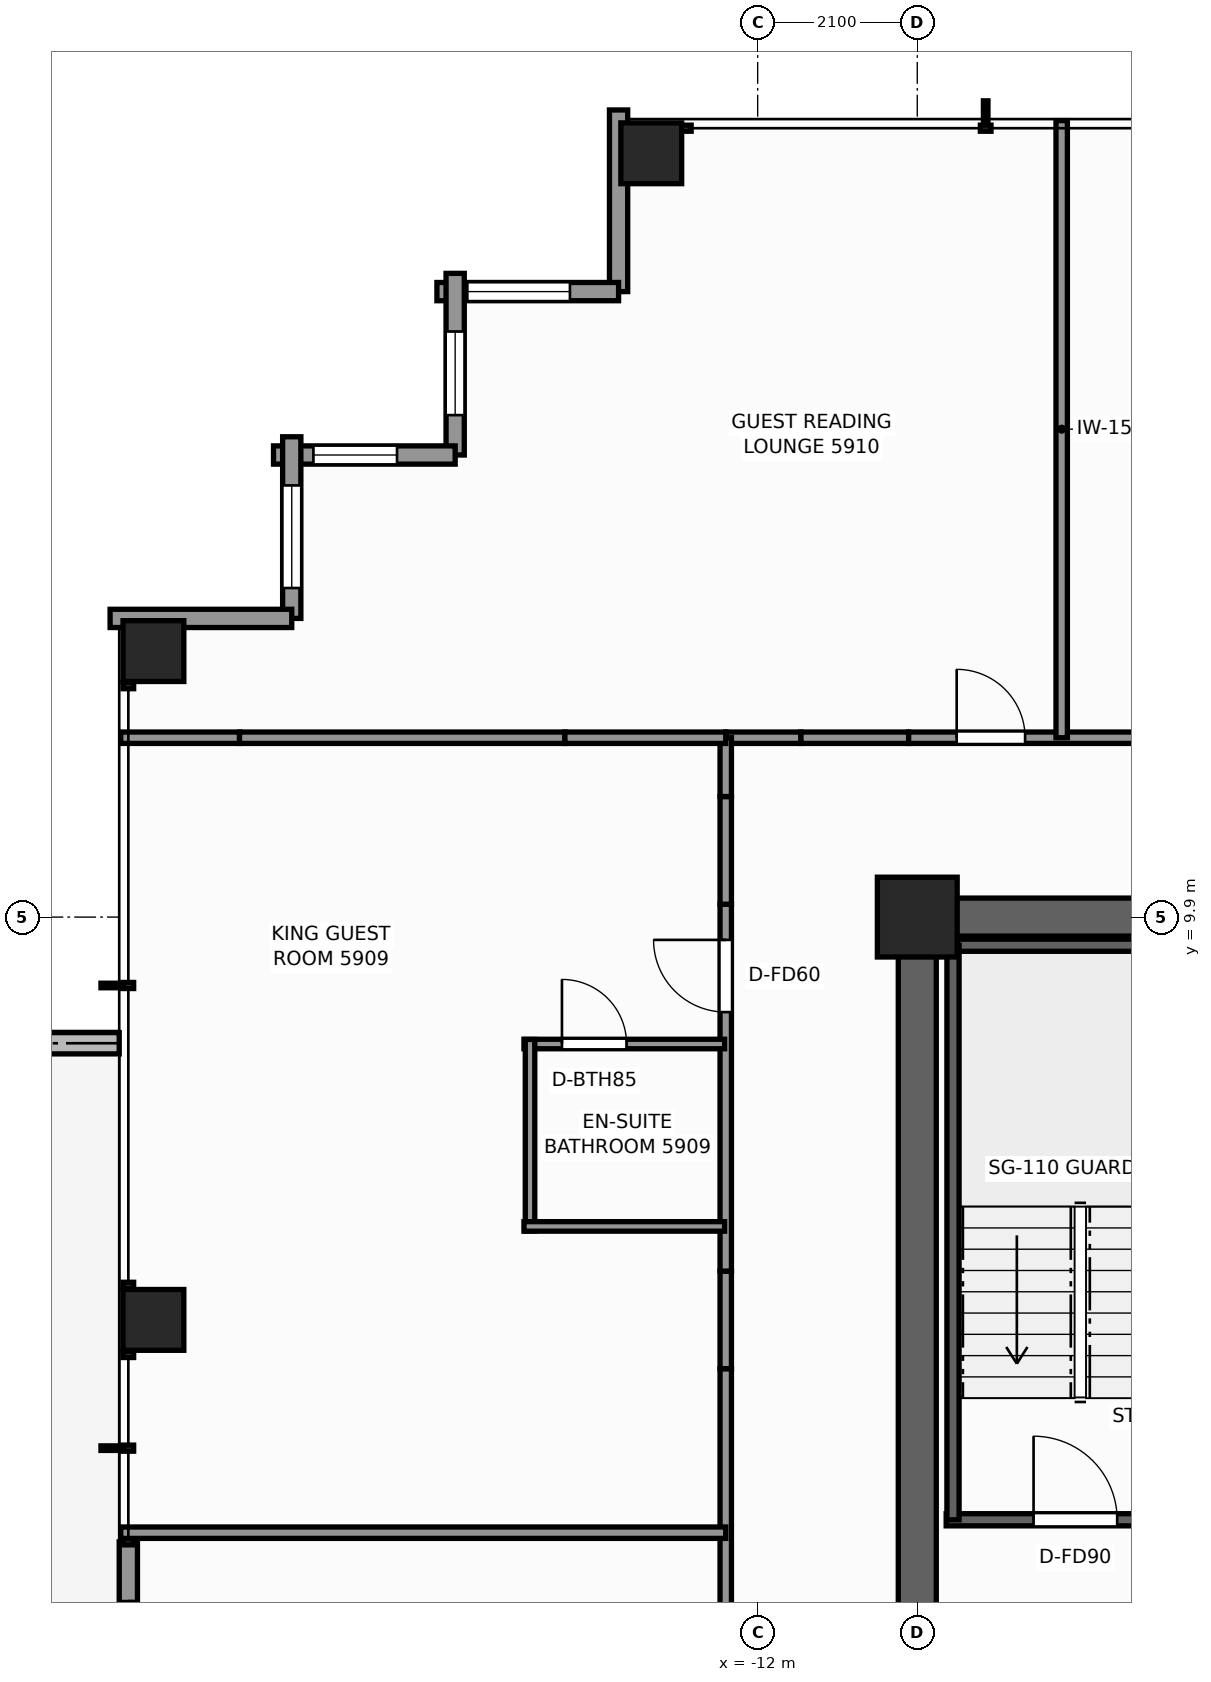
"""IFC4 building model, lengths in metres.
Left out: names, types, materials, properties, quantities, classifications, styles, units other than length and angle.
Written with IfcOpenShell. Run it as: python <this file> out.ifc"""

import sys

from ifc_helpers import new_model, si_unit, direction, frame, frame_2d, origin, origin_2d, place, context, subcontext, project, spatial, rectangle, extrude, element, fill, save


model = new_model("IFC4")
c1 = context("Model", 3, precision=1e-05, world=origin(), true_north=direction((0.0, 1.0)))
c2 = subcontext(c1, "Body", "Model", "MODEL_VIEW")
j1 = project(units=[si_unit("LENGTHUNIT", "METRE"), si_unit("PLANEANGLEUNIT", "RADIAN")], contexts=[c1])
p1 = place(None, origin())
s1 = spatial("IfcSite", under=j1, at=p1, CompositionType="ELEMENT")
p2 = place(p1, origin())
s2 = spatial("IfcBuilding", under=s1, at=p2, CompositionType="ELEMENT")
p3 = place(p2, frame((0.0, 0.0, 203.1)))
s3 = spatial("IfcBuildingStorey", under=s2, at=p3, CompositionType="ELEMENT", Elevation=203.1)
p4 = place(p3, frame((-10.15, 9.9, 0.0), z_axis=(0.0, 0.0, 1.0), x_axis=(1.0, 0.0, 0.0)))
e1 = element("IfcWall", 1, at=p4, inside=s3, PredefinedType="SHEAR", context=c2, shape_type="SweptSolid", body=[
    extrude(rectangle(XDim=14.57, YDim=0.5, at=frame_2d((7.285, 0.0))), origin(), (0.0, 0.0, 1.0), 3.3),
])
p5 = place(p3, frame((-9.9, -3.7, 0.0), z_axis=(0.0, 0.0, 1.0), x_axis=(0.0, 1.0, 0.0)))
e2 = element("IfcWall", 2, at=p5, inside=s3, PredefinedType="SHEAR", context=c2, shape_type="SweptSolid", body=[
    extrude(rectangle(XDim=13.35, YDim=0.5, at=frame_2d((6.675, 0.0))), origin(), (0.0, 0.0, 1.0), 3.3),
])
p6 = place(p5, frame((0.35, 0.0, 0.0)))
e3 = element("IfcOpeningElement", 3, at=p6, cuts=e2, PredefinedType="OPENING", context=c2, shape_type="SweptSolid", body=[
    extrude(rectangle(XDim=1.1, YDim=2.2, at=frame_2d((0.55, 1.1))), frame((0.0, 0.26, 0.0), z_axis=(0.0, -1.0, 0.0), x_axis=(1.0, 0.0, 0.0)), (0.0, 0.0, 1.0), 0.52),
])
p7 = place(p3, frame((-9.9, 9.9, 0.0), z_axis=(0.0, 0.0, 1.0), x_axis=(1.0, 0.0, 0.0)))
e4 = element("IfcColumn", 4, at=p7, inside=s3, PredefinedType="COLUMN", context=c2, shape_type="SweptSolid", body=[
    extrude(rectangle(XDim=1.05, YDim=1.05, at=origin_2d()), origin(), (0.0, 0.0, 1.0), 3.3),
])
for number, where, z_axis, x_axis in (
    (5, (-13.4, 19.95, 0.0), (0.0, 0.0, 1.0), (1.0, 0.0, 0.0)),
    (6, (-19.95, 4.6, 0.0), (0.0, 0.0, 1.0), (1.0, 0.0, 0.0)),
    (7, (-19.95, 13.4, 0.0), (0.0, 0.0, 1.0), (1.0, 0.0, 0.0)),
):
    element("IfcColumn", number, at=place(p3, frame(where, z_axis=z_axis, x_axis=x_axis)), inside=s3, PredefinedType="COLUMN", context=c2, shape_type="SweptSolid", body=[
        extrude(rectangle(XDim=0.8, YDim=0.8, at=origin_2d()), origin(), (0.0, 0.0, 1.0), 3.3),
    ])
p8 = place(p3, frame((-20.4, 8.24, -0.04), z_axis=(0.0, 0.0, 1.0), x_axis=(-1.0, 0.0, 0.0)))
e8 = element("IfcWall", 8, at=p8, inside=s3, PredefinedType="PARAPET", context=c2, shape_type="SweptSolid", body=[
    extrude(rectangle(XDim=3.214, YDim=0.28, at=frame_2d((1.607, 0.0))), origin(), (0.0, 0.0, 1.0), 0.42),
])
p9 = place(p3, frame((-13.83, 18.13, 0.0), z_axis=(0.0, 0.0, 1.0), x_axis=(0.0, 1.0, 0.0)))
e9 = element("IfcWall", 9, at=p9, inside=s3, PredefinedType="STANDARD", context=c2, shape_type="SweptSolid", body=[
    extrude(rectangle(XDim=2.39, YDim=0.24, at=frame_2d((1.195, 0.0))), origin(), (0.0, 0.0, 1.0), 1.275),
])
p10 = place(p3, frame((-16.22, 18.13, 0.0), z_axis=(0.0, 0.0, 1.0), x_axis=(1.0, 0.0, 0.0)))
e10 = element("IfcWall", 10, at=p10, inside=s3, PredefinedType="STANDARD", context=c2, shape_type="SweptSolid", body=[
    extrude(rectangle(XDim=2.39, YDim=0.24, at=frame_2d((1.195, 0.0))), origin(), (0.0, 0.0, 1.0), 2.463),
])
p11 = place(p10, frame((0.4, 0.0, 0.65)))
e11 = element("IfcOpeningElement", 11, at=p11, cuts=e10, PredefinedType="OPENING", context=c2, shape_type="SweptSolid", body=[
    extrude(rectangle(XDim=1.35, YDim=1.55, at=frame_2d((0.675, 0.775))), frame((0.0, 0.13, 0.0), z_axis=(0.0, -1.0, 0.0), x_axis=(1.0, 0.0, 0.0)), (0.0, 0.0, 1.0), 0.26),
])
p12 = place(p3, frame((-15.98, 15.98, 0.0), z_axis=(0.0, 0.0, 1.0), x_axis=(0.0, 1.0, 0.0)))
e12 = element("IfcWall", 12, at=p12, inside=s3, PredefinedType="STANDARD", context=c2, shape_type="SweptSolid", body=[
    extrude(rectangle(XDim=2.39, YDim=0.24, at=frame_2d((1.195, 0.0))), origin(), (0.0, 0.0, 1.0), 2.463),
])
p13 = place(p12, frame((0.525, 0.0, 0.65)))
e13 = element("IfcOpeningElement", 13, at=p13, cuts=e12, PredefinedType="OPENING", context=c2, shape_type="SweptSolid", body=[
    extrude(rectangle(XDim=1.1, YDim=1.45, at=frame_2d((0.55, 0.725))), frame((0.0, 0.13, 0.0), z_axis=(0.0, -1.0, 0.0), x_axis=(1.0, 0.0, 0.0)), (0.0, 0.0, 1.0), 0.26),
])
p14 = place(p3, frame((-18.37, 15.98, 0.0), z_axis=(0.0, 0.0, 1.0), x_axis=(1.0, 0.0, 0.0)))
e14 = element("IfcWall", 14, at=p14, inside=s3, PredefinedType="STANDARD", context=c2, shape_type="SweptSolid", body=[
    extrude(rectangle(XDim=2.39, YDim=0.24, at=frame_2d((1.195, 0.0))), origin(), (0.0, 0.0, 1.0), 2.463),
])
p15 = place(p14, frame((0.525, 0.0, 0.65)))
e15 = element("IfcOpeningElement", 15, at=p15, cuts=e14, PredefinedType="OPENING", context=c2, shape_type="SweptSolid", body=[
    extrude(rectangle(XDim=1.1, YDim=1.45, at=frame_2d((0.55, 0.725))), frame((0.0, 0.13, 0.0), z_axis=(0.0, -1.0, 0.0), x_axis=(1.0, 0.0, 0.0)), (0.0, 0.0, 1.0), 0.26),
])
p16 = place(p3, frame((-18.13, 13.83, 0.0), z_axis=(0.0, 0.0, 1.0), x_axis=(0.0, 1.0, 0.0)))
e16 = element("IfcWall", 16, at=p16, inside=s3, PredefinedType="STANDARD", context=c2, shape_type="SweptSolid", body=[
    extrude(rectangle(XDim=2.39, YDim=0.24, at=frame_2d((1.195, 0.0))), origin(), (0.0, 0.0, 1.0), 2.463),
])
p17 = place(p16, frame((0.4, 0.0, 0.65)))
e17 = element("IfcOpeningElement", 17, at=p17, cuts=e16, PredefinedType="OPENING", context=c2, shape_type="SweptSolid", body=[
    extrude(rectangle(XDim=1.35, YDim=1.55, at=frame_2d((0.675, 0.775))), frame((0.0, 0.13, 0.0), z_axis=(0.0, -1.0, 0.0), x_axis=(1.0, 0.0, 0.0)), (0.0, 0.0, 1.0), 0.26),
])
p18 = place(p3, frame((-20.52, 13.83, 0.0), z_axis=(0.0, 0.0, 1.0), x_axis=(1.0, 0.0, 0.0)))
e18 = element("IfcWall", 18, at=p18, inside=s3, PredefinedType="STANDARD", context=c2, shape_type="SweptSolid", body=[
    extrude(rectangle(XDim=2.39, YDim=0.24, at=frame_2d((1.195, 0.0))), origin(), (0.0, 0.0, 1.0), 1.275),
])
p19 = place(p3, frame((-20.28, -1.68, 0.0), z_axis=(0.0, 0.0, 1.0), x_axis=(0.0, 1.0, 0.0)))
e19 = element("IfcWall", 19, at=p19, inside=s3, PredefinedType="STANDARD", context=c2, shape_type="SweptSolid", body=[
    extrude(rectangle(XDim=3.36, YDim=0.24, at=frame_2d((1.68, 0.0))), origin(), (0.0, 0.0, 1.0), 3.08),
])
p20 = place(p19, frame((0.78, 0.0, 0.0)))
e20 = element("IfcOpeningElement", 20, at=p20, cuts=e19, PredefinedType="OPENING", context=c2, shape_type="SweptSolid", body=[
    extrude(rectangle(XDim=1.8, YDim=2.2, at=frame_2d((0.9, 1.1))), frame((0.0, 0.13, 0.0), z_axis=(0.0, -1.0, 0.0), x_axis=(1.0, 0.0, 0.0)), (0.0, 0.0, 1.0), 0.26),
])
p21 = place(p3, frame((-9.52, 1.97, 0.0), z_axis=(0.0, 0.0, 1.0), x_axis=(1.0, 0.0, 0.0)))
e21 = element("IfcWall", 21, at=p21, inside=s3, PredefinedType="SHEAR", context=c2, shape_type="SweptSolid", body=[
    extrude(rectangle(XDim=3.52, YDim=0.16, at=frame_2d((1.76, 0.0))), origin(), (0.0, 0.0, 1.0), 3.3),
])
p22 = place(p21, frame((1.15, 0.0, 0.0)))
e22 = element("IfcOpeningElement", 22, at=p22, cuts=e21, PredefinedType="OPENING", context=c2, shape_type="SweptSolid", body=[
    extrude(rectangle(XDim=1.1, YDim=2.2, at=frame_2d((0.55, 1.1))), frame((0.0, 0.09, 0.0), z_axis=(0.0, -1.0, 0.0), x_axis=(1.0, 0.0, 0.0)), (0.0, 0.0, 1.0), 0.18),
])
p23 = place(p3, frame((-9.52, 9.53, 0.0), z_axis=(0.0, 0.0, 1.0), x_axis=(1.0, 0.0, 0.0)))
e23 = element("IfcWall", 23, at=p23, inside=s3, PredefinedType="SHEAR", context=c2, shape_type="SweptSolid", body=[
    extrude(rectangle(XDim=3.52, YDim=0.16, at=frame_2d((1.76, 0.0))), origin(), (0.0, 0.0, 1.0), 3.3),
])
p24 = place(p3, frame((-9.43, 1.97, 0.0), z_axis=(0.0, 0.0, 1.0), x_axis=(0.0, 1.0, 0.0)))
e24 = element("IfcWall", 24, at=p24, inside=s3, PredefinedType="SHEAR", context=c2, shape_type="SweptSolid", body=[
    extrude(rectangle(XDim=7.56, YDim=0.16, at=frame_2d((3.78, 0.0))), origin(), (0.0, 0.0, 1.0), 3.3),
])
p25 = place(p3, frame((-12.42, 12.26, 0.0), z_axis=(0.0, 0.0, 1.0), x_axis=(1.0, 0.0, 0.0)))
e25 = element("IfcWall", 25, at=p25, inside=s3, PredefinedType="PARTITIONING", context=c2, shape_type="SweptSolid", body=[
    extrude(rectangle(XDim=0.99, YDim=0.15, at=frame_2d((0.495, 0.0))), origin(), (0.0, 0.0, 1.0), 3.08),
])
p26 = place(p3, frame((-11.43, 12.26, 0.0), z_axis=(0.0, 0.0, 1.0), x_axis=(1.0, 0.0, 0.0)))
e26 = element("IfcWall", 26, at=p26, inside=s3, PredefinedType="PARTITIONING", context=c2, shape_type="SweptSolid", body=[
    extrude(rectangle(XDim=1.417, YDim=0.15, at=frame_2d((0.708, 0.0))), origin(), (0.0, 0.0, 1.0), 1.265),
])
p27 = place(p3, frame((-10.014, 12.26, 0.0), z_axis=(0.0, 0.0, 1.0), x_axis=(1.0, 0.0, 0.0)))
e27 = element("IfcWall", 27, at=p27, inside=s3, PredefinedType="PARTITIONING", context=c2, shape_type="SweptSolid", body=[
    extrude(rectangle(XDim=4.772, YDim=0.15, at=frame_2d((2.386, 0.0))), origin(), (0.0, 0.0, 1.0), 3.08),
])
p28 = place(p27, frame((0.632, 0.0, 0.0)))
e28 = element("IfcOpeningElement", 28, at=p28, cuts=e27, PredefinedType="OPENING", context=c2, shape_type="SweptSolid", body=[
    extrude(rectangle(XDim=0.9, YDim=2.06, at=frame_2d((0.45, 1.03))), frame((0.0, 0.085, 0.0), z_axis=(0.0, -1.0, 0.0), x_axis=(1.0, 0.0, 0.0)), (0.0, 0.0, 1.0), 0.17),
])
p29 = place(p27, frame((2.967, 0.0, 0.0)))
e29 = element("IfcOpeningElement", 29, at=p29, cuts=e27, PredefinedType="OPENING", context=c2, shape_type="SweptSolid", body=[
    extrude(rectangle(XDim=0.9, YDim=2.06, at=frame_2d((0.45, 1.03))), frame((0.0, 0.085, 0.0), z_axis=(0.0, -1.0, 0.0), x_axis=(1.0, 0.0, 0.0)), (0.0, 0.0, 1.0), 0.17),
])
p30 = place(p3, frame((-12.42, -3.958, 0.0), z_axis=(0.0, 0.0, 1.0), x_axis=(0.0, 1.0, 0.0)))
e30 = element("IfcWall", 30, at=p30, inside=s3, PredefinedType="PARTITIONING", context=c2, shape_type="SweptSolid", body=[
    extrude(rectangle(XDim=7.916, YDim=0.15, at=frame_2d((3.958, 0.0))), origin(), (0.0, 0.0, 1.0), 2.605),
])
p31 = place(p3, frame((-12.42, 3.958, 0.0), z_axis=(0.0, 0.0, 1.0), x_axis=(0.0, 1.0, 0.0)))
e31 = element("IfcWall", 31, at=p31, inside=s3, PredefinedType="PARTITIONING", context=c2, shape_type="SweptSolid", body=[
    extrude(rectangle(XDim=1.284, YDim=0.15, at=frame_2d((0.642, 0.0))), origin(), (0.0, 0.0, 1.0), 1.265),
])
p32 = place(p3, frame((-12.42, 5.242, 0.0), z_axis=(0.0, 0.0, 1.0), x_axis=(0.0, 1.0, 0.0)))
e32 = element("IfcWall", 32, at=p32, inside=s3, PredefinedType="PARTITIONING", context=c2, shape_type="SweptSolid", body=[
    extrude(rectangle(XDim=4.827, YDim=0.15, at=frame_2d((2.414, 0.0))), origin(), (0.0, 0.0, 1.0), 3.08),
])
p33 = place(p32, frame((3.408, 0.0, 0.0)))
e33 = element("IfcOpeningElement", 33, at=p33, cuts=e32, PredefinedType="OPENING", context=c2, shape_type="SweptSolid", body=[
    extrude(rectangle(XDim=0.95, YDim=2.06, at=frame_2d((0.475, 1.03))), frame((0.0, 0.085, 0.0), z_axis=(0.0, -1.0, 0.0), x_axis=(1.0, 0.0, 0.0)), (0.0, 0.0, 1.0), 0.17),
])
p34 = place(p3, frame((-12.42, 10.069, 0.0), z_axis=(0.0, 0.0, 1.0), x_axis=(0.0, 1.0, 0.0)))
e34 = element("IfcWall", 34, at=p34, inside=s3, PredefinedType="PARTITIONING", context=c2, shape_type="SweptSolid", body=[
    extrude(rectangle(XDim=1.417, YDim=0.15, at=frame_2d((0.708, 0.0))), origin(), (0.0, 0.0, 1.0), 1.265),
])
p35 = place(p3, frame((-12.42, 11.486, 0.0), z_axis=(0.0, 0.0, 1.0), x_axis=(0.0, 1.0, 0.0)))
e35 = element("IfcWall", 35, at=p35, inside=s3, PredefinedType="PARTITIONING", context=c2, shape_type="SweptSolid", body=[
    extrude(rectangle(XDim=0.774, YDim=0.15, at=frame_2d((0.387, 0.0))), origin(), (0.0, 0.0, 1.0), 3.08),
])
p36 = place(p3, frame((-20.38, 12.26, 0.0), z_axis=(0.0, 0.0, 1.0), x_axis=(1.0, 0.0, 0.0)))
e36 = element("IfcWall", 36, at=p36, inside=s3, PredefinedType="PARTITIONING", context=c2, shape_type="SweptSolid", body=[
    extrude(rectangle(XDim=1.563, YDim=0.15, at=frame_2d((0.781, 0.0))), origin(), (0.0, 0.0, 1.0), 2.453),
])
p37 = place(p3, frame((-18.817, 12.26, 0.0), z_axis=(0.0, 0.0, 1.0), x_axis=(1.0, 0.0, 0.0)))
e37 = element("IfcWall", 37, at=p37, inside=s3, PredefinedType="PARTITIONING", context=c2, shape_type="SweptSolid", body=[
    extrude(rectangle(XDim=4.281, YDim=0.15, at=frame_2d((2.141, 0.0))), origin(), (0.0, 0.0, 1.0), 1.265),
])
p38 = place(p3, frame((-14.536, 12.26, 0.0), z_axis=(0.0, 0.0, 1.0), x_axis=(1.0, 0.0, 0.0)))
e38 = element("IfcWall", 38, at=p38, inside=s3, PredefinedType="PARTITIONING", context=c2, shape_type="SweptSolid", body=[
    extrude(rectangle(XDim=2.116, YDim=0.15, at=frame_2d((1.058, 0.0))), origin(), (0.0, 0.0, 1.0), 3.08),
])
p39 = place(p3, frame((-20.38, 1.8, 0.0), z_axis=(0.0, 0.0, 1.0), x_axis=(1.0, 0.0, 0.0)))
e39 = element("IfcWall", 39, at=p39, inside=s3, PredefinedType="PARTITIONING", context=c2, shape_type="SweptSolid", body=[
    extrude(rectangle(XDim=7.96, YDim=0.15, at=frame_2d((3.98, 0.0))), origin(), (0.0, 0.0, 1.0), 2.453),
])
p40 = place(p3, frame((-15.075, 8.23, 0.0), z_axis=(0.0, 0.0, 1.0), x_axis=(1.0, 0.0, 0.0)))
e40 = element("IfcWall", 40, at=p40, inside=s3, PredefinedType="PARTITIONING", context=c2, shape_type="SweptSolid", body=[
    extrude(rectangle(XDim=2.64, YDim=0.125, at=frame_2d((1.32, 0.0))), origin(), (0.0, 0.0, 1.0), 3.08),
])
p41 = place(p40, frame((0.5, 0.0, 0.0)))
e41 = element("IfcOpeningElement", 41, at=p41, cuts=e40, PredefinedType="OPENING", context=c2, shape_type="SweptSolid", body=[
    extrude(rectangle(XDim=0.85, YDim=2.03, at=frame_2d((0.425, 1.015))), frame((0.0, 0.073, 0.0), z_axis=(0.0, -1.0, 0.0), x_axis=(1.0, 0.0, 0.0)), (0.0, 0.0, 1.0), 0.145),
])
p42 = place(p3, frame((-14.995, 5.77, 0.0), z_axis=(0.0, 0.0, 1.0), x_axis=(0.0, 1.0, 0.0)))
e42 = element("IfcWall", 42, at=p42, inside=s3, PredefinedType="PARTITIONING", context=c2, shape_type="SweptSolid", body=[
    extrude(rectangle(XDim=2.52, YDim=0.125, at=frame_2d((1.26, 0.0))), origin(), (0.0, 0.0, 1.0), 3.08),
])
p43 = place(p3, frame((-15.075, 5.83, 0.0), z_axis=(0.0, 0.0, 1.0), x_axis=(1.0, 0.0, 0.0)))
e43 = element("IfcWall", 43, at=p43, inside=s3, PredefinedType="PARTITIONING", context=c2, shape_type="SweptSolid", body=[
    extrude(rectangle(XDim=2.64, YDim=0.125, at=frame_2d((1.32, 0.0))), origin(), (0.0, 0.0, 1.0), 3.08),
])
p44 = place(p3, frame((-8.0, 12.26, 0.0), z_axis=(0.0, 0.0, 1.0), x_axis=(0.0, 1.0, 0.0)))
e44 = element("IfcWall", 44, at=p44, inside=s3, PredefinedType="PARTITIONING", context=c2, shape_type="SweptSolid", body=[
    extrude(rectangle(XDim=8.12, YDim=0.15, at=frame_2d((4.06, 0.0))), origin(), (0.0, 0.0, 1.0), 2.453),
])
p45 = place(p11, origin())
e45 = element("IfcWindow", 45, at=p45, inside=s3, PartitioningType="SINGLE_PANEL", PredefinedType="WINDOW", context=c2, shape_type="SweptSolid", body=[
    extrude(rectangle(XDim=1.35, YDim=1.55, at=frame_2d((0.675, 0.775))), frame((0.0, 0.03, 0.0), z_axis=(0.0, -1.0, 0.0), x_axis=(1.0, 0.0, 0.0)), (0.0, 0.0, 1.0), 0.06),
])
fill(e11, e45)
p46 = place(p13, origin())
e46 = element("IfcWindow", 46, at=p46, inside=s3, PartitioningType="SINGLE_PANEL", PredefinedType="WINDOW", context=c2, shape_type="SweptSolid", body=[
    extrude(rectangle(XDim=1.1, YDim=1.45, at=frame_2d((0.55, 0.725))), frame((0.0, 0.03, 0.0), z_axis=(0.0, -1.0, 0.0), x_axis=(1.0, 0.0, 0.0)), (0.0, 0.0, 1.0), 0.06),
])
fill(e13, e46)
p47 = place(p15, origin())
e47 = element("IfcWindow", 47, at=p47, inside=s3, PartitioningType="SINGLE_PANEL", PredefinedType="WINDOW", context=c2, shape_type="SweptSolid", body=[
    extrude(rectangle(XDim=1.1, YDim=1.45, at=frame_2d((0.55, 0.725))), frame((0.0, 0.03, 0.0), z_axis=(0.0, -1.0, 0.0), x_axis=(1.0, 0.0, 0.0)), (0.0, 0.0, 1.0), 0.06),
])
fill(e15, e47)
p48 = place(p17, origin())
e48 = element("IfcWindow", 48, at=p48, inside=s3, PartitioningType="SINGLE_PANEL", PredefinedType="WINDOW", context=c2, shape_type="SweptSolid", body=[
    extrude(rectangle(XDim=1.35, YDim=1.55, at=frame_2d((0.675, 0.775))), frame((0.0, 0.03, 0.0), z_axis=(0.0, -1.0, 0.0), x_axis=(1.0, 0.0, 0.0)), (0.0, 0.0, 1.0), 0.06),
])
fill(e17, e48)
p49 = place(p20, origin())
e49 = element("IfcDoor", 49, at=p49, inside=s3, OperationType="DOUBLE_DOOR_SLIDING", PredefinedType="DOOR", context=c2, shape_type="SweptSolid", body=[
    extrude(rectangle(XDim=1.8, YDim=2.2, at=frame_2d((0.9, 1.1))), frame((0.0, 0.025, 0.0), z_axis=(0.0, -1.0, 0.0), x_axis=(1.0, 0.0, 0.0)), (0.0, 0.0, 1.0), 0.05),
])
fill(e20, e49)
p50 = place(p22, origin())
e50 = element("IfcDoor", 50, at=p50, inside=s3, OperationType="SINGLE_SWING_LEFT", PredefinedType="DOOR", context=c2, shape_type="SweptSolid", body=[
    extrude(rectangle(XDim=1.1, YDim=2.2, at=frame_2d((0.55, 1.1))), frame((0.0, 0.025, 0.0), z_axis=(0.0, -1.0, 0.0), x_axis=(1.0, 0.0, 0.0)), (0.0, 0.0, 1.0), 0.05),
])
fill(e22, e50)
p51 = place(p41, origin())
e51 = element("IfcDoor", 51, at=p51, inside=s3, OperationType="SINGLE_SWING_LEFT", PredefinedType="DOOR", context=c2, shape_type="SweptSolid", body=[
    extrude(rectangle(XDim=0.85, YDim=2.03, at=frame_2d((0.425, 1.015))), frame((0.0, 0.025, 0.0), z_axis=(0.0, -1.0, 0.0), x_axis=(1.0, 0.0, 0.0)), (0.0, 0.0, 1.0), 0.05),
])
fill(e41, e51)
p52 = place(p33, origin())
e52 = element("IfcDoor", 52, at=p52, inside=s3, OperationType="SINGLE_SWING_RIGHT", PredefinedType="DOOR", context=c2, shape_type="SweptSolid", body=[
    extrude(rectangle(XDim=0.95, YDim=2.06, at=frame_2d((0.475, 1.03))), frame((0.0, 0.025, 0.0), z_axis=(0.0, -1.0, 0.0), x_axis=(1.0, 0.0, 0.0)), (0.0, 0.0, 1.0), 0.05),
])
fill(e33, e52)
p53 = place(p28, origin())
e53 = element("IfcDoor", 53, at=p53, inside=s3, OperationType="SINGLE_SWING_LEFT", PredefinedType="DOOR", context=c2, shape_type="SweptSolid", body=[
    extrude(rectangle(XDim=0.9, YDim=2.06, at=frame_2d((0.45, 1.03))), frame((0.0, 0.025, 0.0), z_axis=(0.0, -1.0, 0.0), x_axis=(1.0, 0.0, 0.0)), (0.0, 0.0, 1.0), 0.05),
])
fill(e28, e53)
save(model, sys.argv[1])
